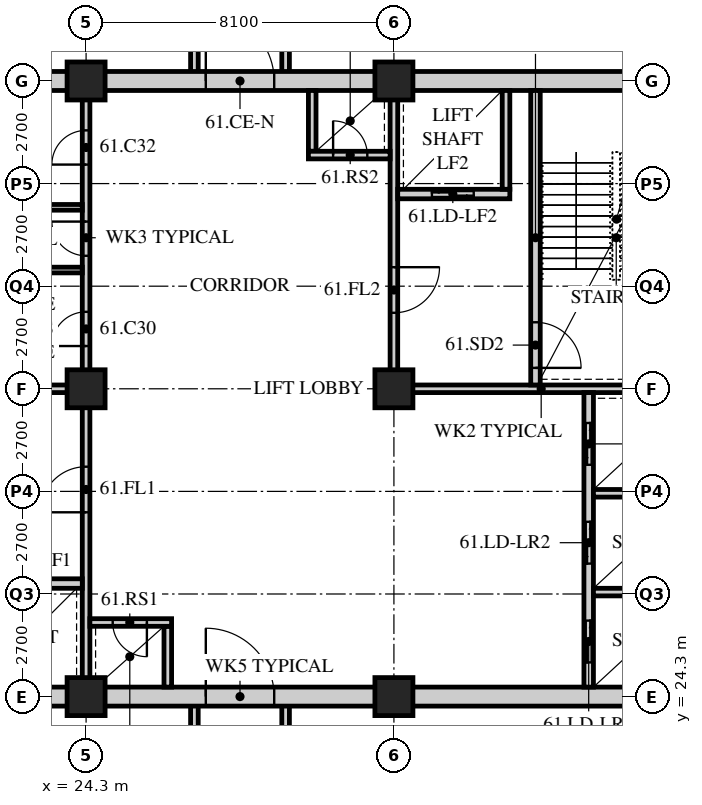
"""IFC4 building model, lengths in metres.
Left out: names, types, materials, properties, quantities, classifications, styles, units other than length and angle.
Written with IfcOpenShell. Run it as: python <this file> out.ifc"""

import sys

from ifc_helpers import new_model, si_unit, direction, frame, frame_2d, origin, origin_2d, place, context, subcontext, project, spatial, rectangle, hollow_rectangle, extrude, element, fill, save


model = new_model("IFC4")
c1 = context("Model", 3, precision=1e-05, world=origin(), true_north=direction((0.0, 1.0)))
c2 = subcontext(c1, "Body", "Model", "MODEL_VIEW")
j1 = project(units=[si_unit("LENGTHUNIT", "METRE"), si_unit("PLANEANGLEUNIT", "RADIAN")], contexts=[c1])
p1 = place(None, origin())
s1 = spatial("IfcSite", under=j1, at=p1, CompositionType="ELEMENT")
p2 = place(p1, origin())
s2 = spatial("IfcBuilding", under=s1, at=p2, CompositionType="ELEMENT")
p3 = place(p2, frame((0.0, 0.0, 235.2)))
s3 = spatial("IfcBuildingStorey", under=s2, at=p3, CompositionType="ELEMENT", Elevation=235.2)
for number, where, z_axis, x_axis in (
    (1, (24.3, 24.3, 0.0), (0.0, 0.0, 1.0), (1.0, 0.0, 0.0)),
    (2, (24.3, 32.4, 0.0), (0.0, 0.0, 1.0), (1.0, 0.0, 0.0)),
    (3, (24.3, 40.5, 0.0), (0.0, 0.0, 1.0), (1.0, 0.0, 0.0)),
    (4, (32.4, 24.3, 0.0), (0.0, 0.0, 1.0), (1.0, 0.0, 0.0)),
    (5, (32.4, 32.4, 0.0), (0.0, 0.0, 1.0), (1.0, 0.0, 0.0)),
    (6, (32.4, 40.5, 0.0), (0.0, 0.0, 1.0), (1.0, 0.0, 0.0)),
):
    element("IfcColumn", number, at=place(p3, frame(where, z_axis=z_axis, x_axis=x_axis)), inside=s3, PredefinedType="COLUMN", context=c2, shape_type="SweptSolid", body=[
        extrude(hollow_rectangle(XDim=1.0, YDim=1.0, WallThickness=0.1, at=origin_2d()), origin(), (0.0, 0.0, 1.0), 7.2),
    ])
for number, where, z_axis, x_axis in (
    (7, (27.15, 20.7, 0.0), (0.0, 0.0, 1.0), (0.0, 1.0, 0.0)),
    (8, (29.55, 20.7, 0.0), (0.0, 0.0, 1.0), (0.0, 1.0, 0.0)),
):
    element("IfcWall", number, at=place(p3, frame(where, z_axis=z_axis, x_axis=x_axis)), inside=s3, PredefinedType="SOLIDWALL", context=c2, shape_type="SweptSolid", body=[
        extrude(rectangle(XDim=3.6, YDim=0.2, at=frame_2d((1.8, 0.0))), origin(), (0.0, 0.0, 1.0), 6.95),
    ])
for number, where, z_axis, x_axis in (
    (9, (27.15, 40.5, 0.0), (0.0, 0.0, 1.0), (0.0, 1.0, 0.0)),
    (10, (29.55, 40.5, 0.0), (0.0, 0.0, 1.0), (0.0, 1.0, 0.0)),
):
    element("IfcWall", number, at=place(p3, frame(where, z_axis=z_axis, x_axis=x_axis)), inside=s3, PredefinedType="SOLIDWALL", context=c2, shape_type="SweptSolid", body=[
        extrude(rectangle(XDim=9.0, YDim=0.2, at=frame_2d((4.5, 0.0))), origin(), (0.0, 0.0, 1.0), 6.95),
    ])
p4 = place(p3, frame((15.95, 24.3, 0.0), z_axis=(0.0, 0.0, 1.0), x_axis=(1.0, 0.0, 0.0)))
e11 = element("IfcWall", 11, at=p4, inside=s3, PredefinedType="SOLIDWALL", context=c2, shape_type="SweptSolid", body=[
    extrude(rectangle(XDim=24.8, YDim=0.5, at=frame_2d((12.4, 0.0))), origin(), (0.0, 0.0, 1.0), 6.188),
])
p5 = place(p4, frame((11.5, 0.0, 0.0)))
e12 = element("IfcOpeningElement", 12, at=p5, cuts=e11, PredefinedType="OPENING", context=c2, shape_type="SweptSolid", body=[
    extrude(rectangle(XDim=1.8, YDim=2.4, at=frame_2d((0.9, 1.2))), frame((0.0, 0.26, 0.0), z_axis=(0.0, -1.0, 0.0), x_axis=(1.0, 0.0, 0.0)), (0.0, 0.0, 1.0), 0.52),
])
p6 = place(p3, frame((15.95, 40.5, 0.0), z_axis=(0.0, 0.0, 1.0), x_axis=(1.0, 0.0, 0.0)))
e13 = element("IfcWall", 13, at=p6, inside=s3, PredefinedType="SOLIDWALL", context=c2, shape_type="SweptSolid", body=[
    extrude(rectangle(XDim=24.8, YDim=0.5, at=frame_2d((12.4, 0.0))), origin(), (0.0, 0.0, 1.0), 6.188),
])
p7 = place(p6, frame((11.5, 0.0, 0.0)))
e14 = element("IfcOpeningElement", 14, at=p7, cuts=e13, PredefinedType="OPENING", context=c2, shape_type="SweptSolid", body=[
    extrude(rectangle(XDim=1.8, YDim=2.4, at=frame_2d((0.9, 1.2))), frame((0.0, 0.26, 0.0), z_axis=(0.0, -1.0, 0.0), x_axis=(1.0, 0.0, 0.0)), (0.0, 0.0, 1.0), 0.52),
])
p8 = place(p3, frame((16.45, 32.4, 0.0), z_axis=(0.0, 0.0, 1.0), x_axis=(1.0, 0.0, 0.0)))
e15 = element("IfcWall", 15, at=p8, inside=s3, PredefinedType="SOLIDWALL", context=c2, shape_type="SweptSolid", body=[
    extrude(rectangle(XDim=7.95, YDim=0.2, at=frame_2d((3.975, 0.0))), origin(), (0.0, 0.0, 1.0), 6.25),
])
p9 = place(p3, frame((24.3, 24.55, 0.0), z_axis=(0.0, 0.0, 1.0), x_axis=(0.0, 1.0, 0.0)))
e16 = element("IfcWall", 16, at=p9, inside=s3, PredefinedType="SOLIDWALL", context=c2, shape_type="SweptSolid", body=[
    extrude(rectangle(XDim=7.75, YDim=0.2, at=frame_2d((3.875, 0.0))), origin(), (0.0, 0.0, 1.0), 6.25),
])
p10 = place(p9, frame((4.6, 0.0, 0.0)))
e17 = element("IfcOpeningElement", 17, at=p10, cuts=e16, PredefinedType="OPENING", context=c2, shape_type="SweptSolid", body=[
    extrude(rectangle(XDim=1.2, YDim=2.1, at=frame_2d((0.6, 1.05))), frame((0.0, 0.11, 0.0), z_axis=(0.0, -1.0, 0.0), x_axis=(1.0, 0.0, 0.0)), (0.0, 0.0, 1.0), 0.22),
])
p11 = place(p3, frame((21.25, 27.275, 0.0), z_axis=(0.0, 0.0, 1.0), x_axis=(1.0, 0.0, 0.0)))
e18 = element("IfcWall", 18, at=p11, inside=s3, PredefinedType="SOLIDWALL", context=c2, shape_type="SweptSolid", body=[
    extrude(rectangle(XDim=2.95, YDim=0.25, at=frame_2d((1.475, 0.0))), origin(), (0.0, 0.0, 1.0), 6.95),
])
p12 = place(p11, frame((0.95, 0.0, 0.0)))
e19 = element("IfcOpeningElement", 19, at=p12, cuts=e18, PredefinedType="OPENING", context=c2, shape_type="SweptSolid", body=[
    extrude(rectangle(XDim=1.1, YDim=2.4, at=frame_2d((0.55, 1.2))), frame((0.0, 0.135, 0.0), z_axis=(0.0, -1.0, 0.0), x_axis=(1.0, 0.0, 0.0)), (0.0, 0.0, 1.0), 0.27),
])
p13 = place(p3, frame((26.45, 24.55, 0.0), z_axis=(0.0, 0.0, 1.0), x_axis=(0.0, 1.0, 0.0)))
e20 = element("IfcWall", 20, at=p13, inside=s3, PredefinedType="SOLIDWALL", context=c2, shape_type="SweptSolid", body=[
    extrude(rectangle(XDim=1.6, YDim=0.2, at=frame_2d((0.8, 0.0))), origin(), (0.0, 0.0, 1.0), 6.95),
])
p14 = place(p3, frame((24.4, 26.25, 0.0), z_axis=(0.0, 0.0, 1.0), x_axis=(1.0, 0.0, 0.0)))
e21 = element("IfcWall", 21, at=p14, inside=s3, PredefinedType="SOLIDWALL", context=c2, shape_type="SweptSolid", body=[
    extrude(rectangle(XDim=2.15, YDim=0.2, at=frame_2d((1.075, 0.0))), origin(), (0.0, 0.0, 1.0), 6.95),
])
p15 = place(p14, frame((0.6, 0.0, 0.0)))
e22 = element("IfcOpeningElement", 22, at=p15, cuts=e21, PredefinedType="OPENING", context=c2, shape_type="SweptSolid", body=[
    extrude(rectangle(XDim=0.9, YDim=2.1, at=frame_2d((0.45, 1.05))), frame((0.0, 0.11, 0.0), z_axis=(0.0, -1.0, 0.0), x_axis=(1.0, 0.0, 0.0)), (0.0, 0.0, 1.0), 0.22),
])
p16 = place(p3, frame((32.3, 32.4, 0.0), z_axis=(0.0, 0.0, 1.0), x_axis=(1.0, 0.0, 0.0)))
e23 = element("IfcWall", 23, at=p16, inside=s3, PredefinedType="SOLIDWALL", context=c2, shape_type="SweptSolid", body=[
    extrude(rectangle(XDim=7.95, YDim=0.2, at=frame_2d((3.975, 0.0))), origin(), (0.0, 0.0, 1.0), 6.25),
])
p17 = place(p3, frame((32.4, 32.5, 0.0), z_axis=(0.0, 0.0, 1.0), x_axis=(0.0, 1.0, 0.0)))
e24 = element("IfcWall", 24, at=p17, inside=s3, PredefinedType="SOLIDWALL", context=c2, shape_type="SweptSolid", body=[
    extrude(rectangle(XDim=7.75, YDim=0.2, at=frame_2d((3.875, 0.0))), origin(), (0.0, 0.0, 1.0), 6.25),
])
p18 = place(p17, frame((1.9, 0.0, 0.0)))
e25 = element("IfcOpeningElement", 25, at=p18, cuts=e24, PredefinedType="OPENING", context=c2, shape_type="SweptSolid", body=[
    extrude(rectangle(XDim=1.2, YDim=2.1, at=frame_2d((0.6, 1.05))), frame((0.0, 0.11, 0.0), z_axis=(0.0, -1.0, 0.0), x_axis=(1.0, 0.0, 0.0)), (0.0, 0.0, 1.0), 0.22),
])
p19 = place(p3, frame((37.525, 24.55, 0.0), z_axis=(0.0, 0.0, 1.0), x_axis=(0.0, 1.0, 0.0)))
e26 = element("IfcWall", 26, at=p19, inside=s3, PredefinedType="SOLIDWALL", context=c2, shape_type="SweptSolid", body=[
    extrude(rectangle(XDim=7.75, YDim=0.25, at=frame_2d((3.875, 0.0))), origin(), (0.0, 0.0, 1.0), 6.95),
])
p20 = place(p19, frame((0.65, 0.0, 0.0)))
e27 = element("IfcOpeningElement", 27, at=p20, cuts=e26, PredefinedType="OPENING", context=c2, shape_type="SweptSolid", body=[
    extrude(rectangle(XDim=1.1, YDim=2.4, at=frame_2d((0.55, 1.2))), frame((0.0, 0.135, 0.0), z_axis=(0.0, -1.0, 0.0), x_axis=(1.0, 0.0, 0.0)), (0.0, 0.0, 1.0), 0.27),
])
p21 = place(p19, frame((3.25, 0.0, 0.0)))
e28 = element("IfcOpeningElement", 28, at=p21, cuts=e26, PredefinedType="OPENING", context=c2, shape_type="SweptSolid", body=[
    extrude(rectangle(XDim=1.1, YDim=2.4, at=frame_2d((0.55, 1.2))), frame((0.0, 0.135, 0.0), z_axis=(0.0, -1.0, 0.0), x_axis=(1.0, 0.0, 0.0)), (0.0, 0.0, 1.0), 0.27),
])
p22 = place(p19, frame((5.85, 0.0, 0.0)))
e29 = element("IfcOpeningElement", 29, at=p22, cuts=e26, PredefinedType="OPENING", context=c2, shape_type="SweptSolid", body=[
    extrude(rectangle(XDim=1.1, YDim=2.4, at=frame_2d((0.55, 1.2))), frame((0.0, 0.135, 0.0), z_axis=(0.0, -1.0, 0.0), x_axis=(1.0, 0.0, 0.0)), (0.0, 0.0, 1.0), 0.27),
])
for number, where, z_axis, x_axis in (
    (30, (37.65, 27.05, 0.0), (0.0, 0.0, 1.0), (1.0, 0.0, 0.0)),
    (31, (37.65, 29.65, 0.0), (0.0, 0.0, 1.0), (1.0, 0.0, 0.0)),
):
    element("IfcWall", number, at=place(p3, frame(where, z_axis=z_axis, x_axis=x_axis)), inside=s3, PredefinedType="SOLIDWALL", context=c2, shape_type="SweptSolid", body=[
        extrude(rectangle(XDim=2.6, YDim=0.2, at=frame_2d((1.3, 0.0))), origin(), (0.0, 0.0, 1.0), 6.95),
    ])
p23 = place(p3, frame((36.125, 32.5, 0.0), z_axis=(0.0, 0.0, 1.0), x_axis=(0.0, 1.0, 0.0)))
e32 = element("IfcWall", 32, at=p23, inside=s3, PredefinedType="SOLIDWALL", context=c2, shape_type="SweptSolid", body=[
    extrude(rectangle(XDim=7.75, YDim=0.25, at=frame_2d((3.875, 0.0))), origin(), (0.0, 0.0, 1.0), 6.95),
])
p24 = place(p23, frame((0.45, 0.0, 0.0)))
e33 = element("IfcOpeningElement", 33, at=p24, cuts=e32, PredefinedType="OPENING", context=c2, shape_type="SweptSolid", body=[
    extrude(rectangle(XDim=1.2, YDim=2.1, at=frame_2d((0.6, 1.05))), frame((0.0, 0.135, 0.0), z_axis=(0.0, -1.0, 0.0), x_axis=(1.0, 0.0, 0.0)), (0.0, 0.0, 1.0), 0.27),
])
p25 = place(p3, frame((32.5, 37.525, 0.0), z_axis=(0.0, 0.0, 1.0), x_axis=(1.0, 0.0, 0.0)))
e34 = element("IfcWall", 34, at=p25, inside=s3, PredefinedType="SOLIDWALL", context=c2, shape_type="SweptSolid", body=[
    extrude(rectangle(XDim=2.95, YDim=0.25, at=frame_2d((1.475, 0.0))), origin(), (0.0, 0.0, 1.0), 6.95),
])
p26 = place(p25, frame((0.9, 0.0, 0.0)))
e35 = element("IfcOpeningElement", 35, at=p26, cuts=e34, PredefinedType="OPENING", context=c2, shape_type="SweptSolid", body=[
    extrude(rectangle(XDim=1.1, YDim=2.4, at=frame_2d((0.55, 1.2))), frame((0.0, 0.135, 0.0), z_axis=(0.0, -1.0, 0.0), x_axis=(1.0, 0.0, 0.0)), (0.0, 0.0, 1.0), 0.27),
])
p27 = place(p3, frame((35.35, 37.65, 0.0), z_axis=(0.0, 0.0, 1.0), x_axis=(0.0, 1.0, 0.0)))
e36 = element("IfcWall", 36, at=p27, inside=s3, PredefinedType="SOLIDWALL", context=c2, shape_type="SweptSolid", body=[
    extrude(rectangle(XDim=2.6, YDim=0.2, at=frame_2d((1.3, 0.0))), origin(), (0.0, 0.0, 1.0), 6.95),
])
p28 = place(p3, frame((30.25, 38.65, 0.0), z_axis=(0.0, 0.0, 1.0), x_axis=(0.0, 1.0, 0.0)))
e37 = element("IfcWall", 37, at=p28, inside=s3, PredefinedType="SOLIDWALL", context=c2, shape_type="SweptSolid", body=[
    extrude(rectangle(XDim=1.6, YDim=0.2, at=frame_2d((0.8, 0.0))), origin(), (0.0, 0.0, 1.0), 6.95),
])
p29 = place(p3, frame((30.15, 38.55, 0.0), z_axis=(0.0, 0.0, 1.0), x_axis=(1.0, 0.0, 0.0)))
e38 = element("IfcWall", 38, at=p29, inside=s3, PredefinedType="SOLIDWALL", context=c2, shape_type="SweptSolid", body=[
    extrude(rectangle(XDim=2.15, YDim=0.2, at=frame_2d((1.075, 0.0))), origin(), (0.0, 0.0, 1.0), 6.95),
])
p30 = place(p29, frame((0.65, 0.0, 0.0)))
e39 = element("IfcOpeningElement", 39, at=p30, cuts=e38, PredefinedType="OPENING", context=c2, shape_type="SweptSolid", body=[
    extrude(rectangle(XDim=0.9, YDim=2.1, at=frame_2d((0.45, 1.05))), frame((0.0, 0.11, 0.0), z_axis=(0.0, -1.0, 0.0), x_axis=(1.0, 0.0, 0.0)), (0.0, 0.0, 1.0), 0.22),
])
p31 = place(p3, frame((24.3, 32.5, 0.0), z_axis=(0.0, 0.0, 1.0), x_axis=(0.0, 1.0, 0.0)))
e40 = element("IfcWall", 40, at=p31, inside=s3, PredefinedType="PARTITIONING", context=c2, shape_type="SweptSolid", body=[
    extrude(rectangle(XDim=7.75, YDim=0.2, at=frame_2d((3.875, 0.0))), origin(), (0.0, 0.0, 1.0), 6.25),
])
p32 = place(p31, frame((1.025, 0.0, 0.0)))
e41 = element("IfcOpeningElement", 41, at=p32, cuts=e40, PredefinedType="OPENING", context=c2, shape_type="SweptSolid", body=[
    extrude(rectangle(XDim=0.9, YDim=2.1, at=frame_2d((0.45, 1.05))), frame((0.0, 0.11, 0.0), z_axis=(0.0, -1.0, 0.0), x_axis=(1.0, 0.0, 0.0)), (0.0, 0.0, 1.0), 0.22),
])
p33 = place(p31, frame((3.4, 0.0, 0.0)))
e42 = element("IfcOpeningElement", 42, at=p33, cuts=e40, PredefinedType="OPENING", context=c2, shape_type="SweptSolid", body=[
    extrude(rectangle(XDim=0.9, YDim=2.1, at=frame_2d((0.45, 1.05))), frame((0.0, 0.11, 0.0), z_axis=(0.0, -1.0, 0.0), x_axis=(1.0, 0.0, 0.0)), (0.0, 0.0, 1.0), 0.22),
])
p34 = place(p31, frame((5.8, 0.0, 0.0)))
e43 = element("IfcOpeningElement", 43, at=p34, cuts=e40, PredefinedType="OPENING", context=c2, shape_type="SweptSolid", body=[
    extrude(rectangle(XDim=0.9, YDim=2.1, at=frame_2d((0.45, 1.05))), frame((0.0, 0.11, 0.0), z_axis=(0.0, -1.0, 0.0), x_axis=(1.0, 0.0, 0.0)), (0.0, 0.0, 1.0), 0.22),
])
for number, where, z_axis, x_axis in (
    (44, (21.05, 35.525, 0.0), (0.0, 0.0, 1.0), (1.0, 0.0, 0.0)),
    (45, (21.05, 37.175, 0.0), (0.0, 0.0, 1.0), (1.0, 0.0, 0.0)),
):
    element("IfcWall", number, at=place(p3, frame(where, z_axis=z_axis, x_axis=x_axis)), inside=s3, PredefinedType="PARTITIONING", context=c2, shape_type="SweptSolid", body=[
        extrude(rectangle(XDim=3.15, YDim=0.15, at=frame_2d((1.575, 0.0))), origin(), (0.0, 0.0, 1.0), 6.95),
    ])
p35 = place(p32, origin())
e46 = element("IfcDoor", 46, at=p35, inside=s3, OperationType="SINGLE_SWING_LEFT", PredefinedType="DOOR", context=c2, shape_type="SweptSolid", body=[
    extrude(rectangle(XDim=0.9, YDim=2.1, at=frame_2d((0.45, 1.05))), frame((0.0, 0.025, 0.0), z_axis=(0.0, -1.0, 0.0), x_axis=(1.0, 0.0, 0.0)), (0.0, 0.0, 1.0), 0.05),
])
fill(e41, e46)
p36 = place(p33, origin())
e47 = element("IfcDoor", 47, at=p36, inside=s3, OperationType="SINGLE_SWING_RIGHT", PredefinedType="DOOR", context=c2, shape_type="SweptSolid", body=[
    extrude(rectangle(XDim=0.9, YDim=2.1, at=frame_2d((0.45, 1.05))), frame((0.0, 0.025, 0.0), z_axis=(0.0, -1.0, 0.0), x_axis=(1.0, 0.0, 0.0)), (0.0, 0.0, 1.0), 0.05),
])
fill(e42, e47)
p37 = place(p34, origin())
e48 = element("IfcDoor", 48, at=p37, inside=s3, OperationType="SINGLE_SWING_LEFT", PredefinedType="DOOR", context=c2, shape_type="SweptSolid", body=[
    extrude(rectangle(XDim=0.9, YDim=2.1, at=frame_2d((0.45, 1.05))), frame((0.0, 0.025, 0.0), z_axis=(0.0, -1.0, 0.0), x_axis=(1.0, 0.0, 0.0)), (0.0, 0.0, 1.0), 0.05),
])
fill(e43, e48)
p38 = place(p10, origin())
e49 = element("IfcDoor", 49, at=p38, inside=s3, OperationType="SINGLE_SWING_LEFT", PredefinedType="DOOR", context=c2, shape_type="SweptSolid", body=[
    extrude(rectangle(XDim=1.2, YDim=2.1, at=frame_2d((0.6, 1.05))), frame((0.0, 0.025, 0.0), z_axis=(0.0, -1.0, 0.0), x_axis=(1.0, 0.0, 0.0)), (0.0, 0.0, 1.0), 0.05),
])
fill(e17, e49)
p39 = place(p15, origin())
e50 = element("IfcDoor", 50, at=p39, inside=s3, OperationType="SINGLE_SWING_LEFT", PredefinedType="DOOR", context=c2, shape_type="SweptSolid", body=[
    extrude(rectangle(XDim=0.9, YDim=2.1, at=frame_2d((0.45, 1.05))), frame((0.0, 0.025, 0.0), z_axis=(0.0, -1.0, 0.0), x_axis=(1.0, 0.0, 0.0)), (0.0, 0.0, 1.0), 0.05),
])
fill(e22, e50)
p40 = place(p24, origin())
e51 = element("IfcDoor", 51, at=p40, inside=s3, OperationType="SINGLE_SWING_RIGHT", PredefinedType="DOOR", context=c2, shape_type="SweptSolid", body=[
    extrude(rectangle(XDim=1.2, YDim=2.1, at=frame_2d((0.6, 1.05))), frame((0.0, 0.025, 0.0), z_axis=(0.0, -1.0, 0.0), x_axis=(1.0, 0.0, 0.0)), (0.0, 0.0, 1.0), 0.05),
])
fill(e33, e51)
p41 = place(p18, origin())
e52 = element("IfcDoor", 52, at=p41, inside=s3, OperationType="SINGLE_SWING_LEFT", PredefinedType="DOOR", context=c2, shape_type="SweptSolid", body=[
    extrude(rectangle(XDim=1.2, YDim=2.1, at=frame_2d((0.6, 1.05))), frame((0.0, 0.025, 0.0), z_axis=(0.0, -1.0, 0.0), x_axis=(1.0, 0.0, 0.0)), (0.0, 0.0, 1.0), 0.05),
])
fill(e25, e52)
p42 = place(p30, origin())
e53 = element("IfcDoor", 53, at=p42, inside=s3, OperationType="SINGLE_SWING_LEFT", PredefinedType="DOOR", context=c2, shape_type="SweptSolid", body=[
    extrude(rectangle(XDim=0.9, YDim=2.1, at=frame_2d((0.45, 1.05))), frame((0.0, 0.025, 0.0), z_axis=(0.0, -1.0, 0.0), x_axis=(1.0, 0.0, 0.0)), (0.0, 0.0, 1.0), 0.05),
])
fill(e39, e53)
p43 = place(p20, origin())
e54 = element("IfcDoor", 54, at=p43, inside=s3, OperationType="DOUBLE_DOOR_SLIDING", PredefinedType="DOOR", context=c2, shape_type="SweptSolid", body=[
    extrude(rectangle(XDim=1.1, YDim=2.4, at=frame_2d((0.55, 1.2))), frame((0.0, 0.025, 0.0), z_axis=(0.0, -1.0, 0.0), x_axis=(1.0, 0.0, 0.0)), (0.0, 0.0, 1.0), 0.05),
])
fill(e27, e54)
p44 = place(p21, origin())
e55 = element("IfcDoor", 55, at=p44, inside=s3, OperationType="DOUBLE_DOOR_SLIDING", PredefinedType="DOOR", context=c2, shape_type="SweptSolid", body=[
    extrude(rectangle(XDim=1.1, YDim=2.4, at=frame_2d((0.55, 1.2))), frame((0.0, 0.025, 0.0), z_axis=(0.0, -1.0, 0.0), x_axis=(1.0, 0.0, 0.0)), (0.0, 0.0, 1.0), 0.05),
])
fill(e28, e55)
p45 = place(p22, origin())
e56 = element("IfcDoor", 56, at=p45, inside=s3, OperationType="DOUBLE_DOOR_SLIDING", PredefinedType="DOOR", context=c2, shape_type="SweptSolid", body=[
    extrude(rectangle(XDim=1.1, YDim=2.4, at=frame_2d((0.55, 1.2))), frame((0.0, 0.025, 0.0), z_axis=(0.0, -1.0, 0.0), x_axis=(1.0, 0.0, 0.0)), (0.0, 0.0, 1.0), 0.05),
])
fill(e29, e56)
p46 = place(p26, origin())
e57 = element("IfcDoor", 57, at=p46, inside=s3, OperationType="DOUBLE_DOOR_SLIDING", PredefinedType="DOOR", context=c2, shape_type="SweptSolid", body=[
    extrude(rectangle(XDim=1.1, YDim=2.4, at=frame_2d((0.55, 1.2))), frame((0.0, 0.025, 0.0), z_axis=(0.0, -1.0, 0.0), x_axis=(1.0, 0.0, 0.0)), (0.0, 0.0, 1.0), 0.05),
])
fill(e35, e57)
p47 = place(p5, origin())
e58 = element("IfcDoor", 58, at=p47, inside=s3, OperationType="DOUBLE_DOOR_SINGLE_SWING", PredefinedType="DOOR", context=c2, shape_type="SweptSolid", body=[
    extrude(rectangle(XDim=1.8, YDim=2.4, at=frame_2d((0.9, 1.2))), frame((0.0, 0.025, 0.0), z_axis=(0.0, -1.0, 0.0), x_axis=(1.0, 0.0, 0.0)), (0.0, 0.0, 1.0), 0.05),
])
fill(e12, e58)
p48 = place(p7, origin())
e59 = element("IfcDoor", 59, at=p48, inside=s3, OperationType="DOUBLE_DOOR_SINGLE_SWING", PredefinedType="DOOR", context=c2, shape_type="SweptSolid", body=[
    extrude(rectangle(XDim=1.8, YDim=2.4, at=frame_2d((0.9, 1.2))), frame((0.0, 0.025, 0.0), z_axis=(0.0, -1.0, 0.0), x_axis=(1.0, 0.0, 0.0)), (0.0, 0.0, 1.0), 0.05),
])
fill(e14, e59)
save(model, sys.argv[1])
